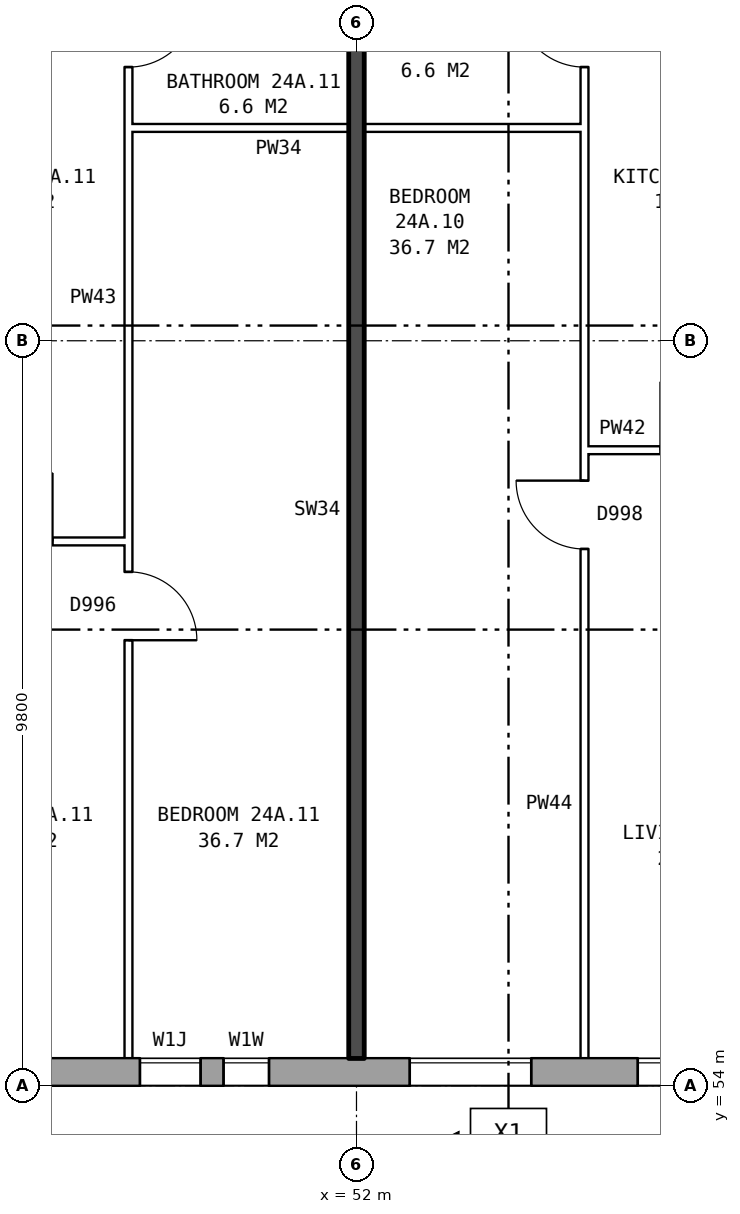
"""IFC4 building model, lengths in metres.
Left out: names, types, materials, properties, quantities, classifications, styles, units other than length and angle.
Written with IfcOpenShell. Run it as: python <this file> out.ifc"""

import sys

from ifc_helpers import new_model, si_unit, direction, frame, frame_2d, origin, place, context, subcontext, project, spatial, rectangle, extrude, element, fill, save


model = new_model("IFC4")
c1 = context("Model", 3, precision=1e-05, world=origin(), true_north=direction((0.0, 1.0)))
c2 = subcontext(c1, "Body", "Model", "MODEL_VIEW")
j1 = project(units=[si_unit("LENGTHUNIT", "METRE"), si_unit("PLANEANGLEUNIT", "RADIAN")], contexts=[c1])
p1 = place(None, origin())
s1 = spatial("IfcSite", under=j1, at=p1, CompositionType="ELEMENT")
p2 = place(p1, origin())
s2 = spatial("IfcBuilding", under=s1, at=p2, CompositionType="ELEMENT")
p3 = place(p2, frame((0.0, 0.0, 87.1)))
s3 = spatial("IfcBuildingStorey", under=s2, at=p3, CompositionType="ELEMENT", Elevation=87.1)
p4 = place(p3, frame((26.325, 54.18, 0.0), z_axis=(0.0, 0.0, 1.0), x_axis=(1.0, 0.0, 0.0)))
e1 = element("IfcWall", 1, at=p4, inside=s3, PredefinedType="STANDARD", context=c2, shape_type="SweptSolid", body=[
    extrude(rectangle(XDim=46.601, YDim=0.36, at=frame_2d((23.3, 0.0))), origin(), (0.0, 0.0, 1.0), 2.85),
])
p5 = place(p4, frame((2.375, 0.0, 0.8)))
e2 = element("IfcOpeningElement", 2, at=p5, cuts=e1, PredefinedType="OPENING", context=c2, shape_type="SweptSolid", body=[
    extrude(rectangle(XDim=1.6, YDim=1.8, at=frame_2d((0.8, 0.9))), frame((0.0, 0.19, 0.0), z_axis=(0.0, -1.0, 0.0), x_axis=(1.0, 0.0, 0.0)), (0.0, 0.0, 1.0), 0.38),
])
p6 = place(p4, frame((5.375, 0.0, 0.8)))
e3 = element("IfcOpeningElement", 3, at=p6, cuts=e1, PredefinedType="OPENING", context=c2, shape_type="SweptSolid", body=[
    extrude(rectangle(XDim=1.6, YDim=1.8, at=frame_2d((0.8, 0.9))), frame((0.0, 0.19, 0.0), z_axis=(0.0, -1.0, 0.0), x_axis=(1.0, 0.0, 0.0)), (0.0, 0.0, 1.0), 0.38),
])
p7 = place(p4, frame((8.375, 0.0, 0.8)))
e4 = element("IfcOpeningElement", 4, at=p7, cuts=e1, PredefinedType="OPENING", context=c2, shape_type="SweptSolid", body=[
    extrude(rectangle(XDim=1.6, YDim=1.8, at=frame_2d((0.8, 0.9))), frame((0.0, 0.19, 0.0), z_axis=(0.0, -1.0, 0.0), x_axis=(1.0, 0.0, 0.0)), (0.0, 0.0, 1.0), 0.38),
])
p8 = place(p4, frame((11.375, 0.0, 0.8)))
e5 = element("IfcOpeningElement", 5, at=p8, cuts=e1, PredefinedType="OPENING", context=c2, shape_type="SweptSolid", body=[
    extrude(rectangle(XDim=1.6, YDim=1.8, at=frame_2d((0.8, 0.9))), frame((0.0, 0.19, 0.0), z_axis=(0.0, -1.0, 0.0), x_axis=(1.0, 0.0, 0.0)), (0.0, 0.0, 1.0), 0.38),
])
p9 = place(p4, frame((14.375, 0.0, 0.8)))
e6 = element("IfcOpeningElement", 6, at=p9, cuts=e1, PredefinedType="OPENING", context=c2, shape_type="SweptSolid", body=[
    extrude(rectangle(XDim=1.6, YDim=1.8, at=frame_2d((0.8, 0.9))), frame((0.0, 0.19, 0.0), z_axis=(0.0, -1.0, 0.0), x_axis=(1.0, 0.0, 0.0)), (0.0, 0.0, 1.0), 0.38),
])
p10 = place(p4, frame((17.375, 0.0, 0.8)))
e7 = element("IfcOpeningElement", 7, at=p10, cuts=e1, PredefinedType="OPENING", context=c2, shape_type="SweptSolid", body=[
    extrude(rectangle(XDim=1.6, YDim=1.8, at=frame_2d((0.8, 0.9))), frame((0.0, 0.19, 0.0), z_axis=(0.0, -1.0, 0.0), x_axis=(1.0, 0.0, 0.0)), (0.0, 0.0, 1.0), 0.38),
])
p11 = place(p4, frame((19.875, 0.0, 1.4)))
e8 = element("IfcOpeningElement", 8, at=p11, cuts=e1, PredefinedType="OPENING", context=c2, shape_type="SweptSolid", body=[
    extrude(rectangle(XDim=1.2, YDim=1.2, at=frame_2d((0.6, 0.6))), frame((0.0, 0.19, 0.0), z_axis=(0.0, -1.0, 0.0), x_axis=(1.0, 0.0, 0.0)), (0.0, 0.0, 1.0), 0.38),
])
p12 = place(p4, frame((22.825, 0.0, 0.25)))
e9 = element("IfcOpeningElement", 9, at=p12, cuts=e1, PredefinedType="OPENING", context=c2, shape_type="SweptSolid", body=[
    extrude(rectangle(XDim=0.8, YDim=1.5, at=frame_2d((0.4, 0.75))), frame((0.0, 0.19, 0.0), z_axis=(0.0, -1.0, 0.0), x_axis=(1.0, 0.0, 0.0)), (0.0, 0.0, 1.0), 0.38),
])
p13 = place(p4, frame((26.375, 0.0, 0.8)))
e10 = element("IfcOpeningElement", 10, at=p13, cuts=e1, PredefinedType="OPENING", context=c2, shape_type="SweptSolid", body=[
    extrude(rectangle(XDim=1.6, YDim=1.8, at=frame_2d((0.8, 0.9))), frame((0.0, 0.19, 0.0), z_axis=(0.0, -1.0, 0.0), x_axis=(1.0, 0.0, 0.0)), (0.0, 0.0, 1.0), 0.38),
])
p14 = place(p4, frame((29.375, 0.0, 0.8)))
e11 = element("IfcOpeningElement", 11, at=p14, cuts=e1, PredefinedType="OPENING", context=c2, shape_type="SweptSolid", body=[
    extrude(rectangle(XDim=1.6, YDim=1.8, at=frame_2d((0.8, 0.9))), frame((0.0, 0.19, 0.0), z_axis=(0.0, -1.0, 0.0), x_axis=(1.0, 0.0, 0.0)), (0.0, 0.0, 1.0), 0.38),
])
p15 = place(p4, frame((32.375, 0.0, 0.8)))
e12 = element("IfcOpeningElement", 12, at=p15, cuts=e1, PredefinedType="OPENING", context=c2, shape_type="SweptSolid", body=[
    extrude(rectangle(XDim=1.6, YDim=1.8, at=frame_2d((0.8, 0.9))), frame((0.0, 0.19, 0.0), z_axis=(0.0, -1.0, 0.0), x_axis=(1.0, 0.0, 0.0)), (0.0, 0.0, 1.0), 0.38),
])
p16 = place(p4, frame((35.375, 0.0, 0.8)))
e13 = element("IfcOpeningElement", 13, at=p16, cuts=e1, PredefinedType="OPENING", context=c2, shape_type="SweptSolid", body=[
    extrude(rectangle(XDim=1.6, YDim=1.8, at=frame_2d((0.8, 0.9))), frame((0.0, 0.19, 0.0), z_axis=(0.0, -1.0, 0.0), x_axis=(1.0, 0.0, 0.0)), (0.0, 0.0, 1.0), 0.38),
])
p17 = place(p4, frame((38.375, 0.0, 0.8)))
e14 = element("IfcOpeningElement", 14, at=p17, cuts=e1, PredefinedType="OPENING", context=c2, shape_type="SweptSolid", body=[
    extrude(rectangle(XDim=1.6, YDim=1.8, at=frame_2d((0.8, 0.9))), frame((0.0, 0.19, 0.0), z_axis=(0.0, -1.0, 0.0), x_axis=(1.0, 0.0, 0.0)), (0.0, 0.0, 1.0), 0.38),
])
p18 = place(p4, frame((41.375, 0.0, 0.8)))
e15 = element("IfcOpeningElement", 15, at=p18, cuts=e1, PredefinedType="OPENING", context=c2, shape_type="SweptSolid", body=[
    extrude(rectangle(XDim=1.6, YDim=1.8, at=frame_2d((0.8, 0.9))), frame((0.0, 0.19, 0.0), z_axis=(0.0, -1.0, 0.0), x_axis=(1.0, 0.0, 0.0)), (0.0, 0.0, 1.0), 0.38),
])
p19 = place(p4, frame((44.375, 0.0, 0.8)))
e16 = element("IfcOpeningElement", 16, at=p19, cuts=e1, PredefinedType="OPENING", context=c2, shape_type="SweptSolid", body=[
    extrude(rectangle(XDim=1.6, YDim=1.8, at=frame_2d((0.8, 0.9))), frame((0.0, 0.19, 0.0), z_axis=(0.0, -1.0, 0.0), x_axis=(1.0, 0.0, 0.0)), (0.0, 0.0, 1.0), 0.38),
])
p20 = place(p4, frame((23.925, 0.0, 0.15)))
e17 = element("IfcOpeningElement", 17, at=p20, cuts=e1, PredefinedType="OPENING", context=c2, shape_type="SweptSolid", body=[
    extrude(rectangle(XDim=0.6, YDim=0.9, at=frame_2d((0.3, 0.45))), frame((0.0, 0.19, 0.0), z_axis=(0.0, -1.0, 0.0), x_axis=(1.0, 0.0, 0.0)), (0.0, 0.0, 1.0), 0.38),
])
p21 = place(p3, frame((46.1, 61.16, 0.0), z_axis=(0.0, 0.0, 1.0), x_axis=(1.0, 0.0, 0.0)))
e18 = element("IfcWall", 18, at=p21, inside=s3, PredefinedType="PARTITIONING", context=c2, shape_type="SweptSolid", body=[
    extrude(rectangle(XDim=2.9, YDim=0.1, at=frame_2d((1.45, 0.0))), origin(), (0.0, 0.0, 1.0), 2.85),
])
p22 = place(p21, frame((1.0, 0.0, 0.0)))
e19 = element("IfcOpeningElement", 19, at=p22, cuts=e18, PredefinedType="OPENING", context=c2, shape_type="SweptSolid", body=[
    extrude(rectangle(XDim=0.9, YDim=2.1, at=frame_2d((0.45, 1.05))), frame((0.0, 0.06, 0.0), z_axis=(0.0, -1.0, 0.0), x_axis=(1.0, 0.0, 0.0)), (0.0, 0.0, 1.0), 0.12),
])
p23 = place(p3, frame((55.0, 62.36, 0.0), z_axis=(0.0, 0.0, 1.0), x_axis=(1.0, 0.0, 0.0)))
e20 = element("IfcWall", 20, at=p23, inside=s3, PredefinedType="PARTITIONING", context=c2, shape_type="SweptSolid", body=[
    extrude(rectangle(XDim=2.9, YDim=0.1, at=frame_2d((1.45, 0.0))), origin(), (0.0, 0.0, 1.0), 2.85),
])
p24 = place(p23, frame((1.0, 0.0, 0.0)))
e21 = element("IfcOpeningElement", 21, at=p24, cuts=e20, PredefinedType="OPENING", context=c2, shape_type="SweptSolid", body=[
    extrude(rectangle(XDim=0.9, YDim=2.1, at=frame_2d((0.45, 1.05))), frame((0.0, 0.06, 0.0), z_axis=(0.0, -1.0, 0.0), x_axis=(1.0, 0.0, 0.0)), (0.0, 0.0, 1.0), 0.12),
])
p25 = place(p3, frame((49.0, 66.6, 0.0), z_axis=(0.0, 0.0, 1.0), x_axis=(1.0, 0.0, 0.0)))
e22 = element("IfcWall", 22, at=p25, inside=s3, PredefinedType="PARTITIONING", context=c2, shape_type="SweptSolid", body=[
    extrude(rectangle(XDim=6.0, YDim=0.1, at=frame_2d((3.0, 0.0))), origin(), (0.0, 0.0, 1.0), 2.85),
])
p26 = place(p3, frame((49.0, 54.36, 0.0), z_axis=(0.0, 0.0, 1.0), x_axis=(0.0, 1.0, 0.0)))
e23 = element("IfcWall", 23, at=p26, inside=s3, PredefinedType="PARTITIONING", context=c2, shape_type="SweptSolid", body=[
    extrude(rectangle(XDim=14.34, YDim=0.1, at=frame_2d((7.17, 0.0))), origin(), (0.0, 0.0, 1.0), 2.85),
])
p27 = place(p26, frame((5.5, 0.0, 0.0)))
e24 = element("IfcOpeningElement", 24, at=p27, cuts=e23, PredefinedType="OPENING", context=c2, shape_type="SweptSolid", body=[
    extrude(rectangle(XDim=0.9, YDim=2.1, at=frame_2d((0.45, 1.05))), frame((0.0, 0.06, 0.0), z_axis=(0.0, -1.0, 0.0), x_axis=(1.0, 0.0, 0.0)), (0.0, 0.0, 1.0), 0.12),
])
p28 = place(p26, frame((13.04, 0.0, 0.0)))
e25 = element("IfcOpeningElement", 25, at=p28, cuts=e23, PredefinedType="OPENING", context=c2, shape_type="SweptSolid", body=[
    extrude(rectangle(XDim=0.9, YDim=2.1, at=frame_2d((0.45, 1.05))), frame((0.0, 0.06, 0.0), z_axis=(0.0, -1.0, 0.0), x_axis=(1.0, 0.0, 0.0)), (0.0, 0.0, 1.0), 0.12),
])
p29 = place(p3, frame((52.0, 54.36, 0.0), z_axis=(0.0, 0.0, 1.0), x_axis=(0.0, 1.0, 0.0)))
e26 = element("IfcWall", 26, at=p29, inside=s3, PredefinedType="SOLIDWALL", context=c2, shape_type="SweptSolid", body=[
    extrude(rectangle(XDim=14.44, YDim=0.2, at=frame_2d((7.22, 0.0))), origin(), (0.0, 0.0, 1.0), 2.85),
])
p30 = place(p3, frame((55.0, 54.36, 0.0), z_axis=(0.0, 0.0, 1.0), x_axis=(0.0, 1.0, 0.0)))
e27 = element("IfcWall", 27, at=p30, inside=s3, PredefinedType="PARTITIONING", context=c2, shape_type="SweptSolid", body=[
    extrude(rectangle(XDim=14.34, YDim=0.1, at=frame_2d((7.17, 0.0))), origin(), (0.0, 0.0, 1.0), 2.85),
])
p31 = place(p30, frame((6.7, 0.0, 0.0)))
e28 = element("IfcOpeningElement", 28, at=p31, cuts=e27, PredefinedType="OPENING", context=c2, shape_type="SweptSolid", body=[
    extrude(rectangle(XDim=0.9, YDim=2.1, at=frame_2d((0.45, 1.05))), frame((0.0, 0.06, 0.0), z_axis=(0.0, -1.0, 0.0), x_axis=(1.0, 0.0, 0.0)), (0.0, 0.0, 1.0), 0.12),
])
p32 = place(p30, frame((13.04, 0.0, 0.0)))
e29 = element("IfcOpeningElement", 29, at=p32, cuts=e27, PredefinedType="OPENING", context=c2, shape_type="SweptSolid", body=[
    extrude(rectangle(XDim=0.9, YDim=2.1, at=frame_2d((0.45, 1.05))), frame((0.0, 0.06, 0.0), z_axis=(0.0, -1.0, 0.0), x_axis=(1.0, 0.0, 0.0)), (0.0, 0.0, 1.0), 0.12),
])
p33 = place(p12, origin())
e30 = element("IfcWindow", 30, at=p33, inside=s3, PartitioningType="SINGLE_PANEL", PredefinedType="WINDOW", context=c2, shape_type="SweptSolid", body=[
    extrude(rectangle(XDim=0.8, YDim=1.5, at=frame_2d((0.4, 0.75))), frame((0.0, 0.15, 0.0), z_axis=(0.0, -1.0, 0.0), x_axis=(1.0, 0.0, 0.0)), (0.0, 0.0, 1.0), 0.06),
])
fill(e9, e30)
p34 = place(p13, origin())
e31 = element("IfcWindow", 31, at=p34, inside=s3, PartitioningType="SINGLE_PANEL", PredefinedType="WINDOW", context=c2, shape_type="SweptSolid", body=[
    extrude(rectangle(XDim=1.6, YDim=1.8, at=frame_2d((0.8, 0.9))), frame((0.0, 0.15, 0.0), z_axis=(0.0, -1.0, 0.0), x_axis=(1.0, 0.0, 0.0)), (0.0, 0.0, 1.0), 0.06),
])
fill(e10, e31)
p35 = place(p14, origin())
e32 = element("IfcWindow", 32, at=p35, inside=s3, PartitioningType="SINGLE_PANEL", PredefinedType="WINDOW", context=c2, shape_type="SweptSolid", body=[
    extrude(rectangle(XDim=1.6, YDim=1.8, at=frame_2d((0.8, 0.9))), frame((0.0, 0.15, 0.0), z_axis=(0.0, -1.0, 0.0), x_axis=(1.0, 0.0, 0.0)), (0.0, 0.0, 1.0), 0.06),
])
fill(e11, e32)
p36 = place(p31, origin())
e33 = element("IfcDoor", 33, at=p36, inside=s3, OperationType="SINGLE_SWING_RIGHT", PredefinedType="DOOR", context=c2, shape_type="SweptSolid", body=[
    extrude(rectangle(XDim=0.9, YDim=2.1, at=frame_2d((0.45, 1.05))), frame((0.0, 0.025, 0.0), z_axis=(0.0, -1.0, 0.0), x_axis=(1.0, 0.0, 0.0)), (0.0, 0.0, 1.0), 0.05),
])
fill(e28, e33)
p37 = place(p32, origin())
e34 = element("IfcDoor", 34, at=p37, inside=s3, OperationType="SINGLE_SWING_RIGHT", PredefinedType="DOOR", context=c2, shape_type="SweptSolid", body=[
    extrude(rectangle(XDim=0.9, YDim=2.1, at=frame_2d((0.45, 1.05))), frame((0.0, 0.025, 0.0), z_axis=(0.0, -1.0, 0.0), x_axis=(1.0, 0.0, 0.0)), (0.0, 0.0, 1.0), 0.05),
])
fill(e29, e34)
p38 = place(p27, frame((0.9, 0.0, 0.0), z_axis=(0.0, 0.0, 1.0), x_axis=(-1.0, 0.0, 0.0)))
e35 = element("IfcDoor", 35, at=p38, inside=s3, OperationType="SINGLE_SWING_RIGHT", PredefinedType="DOOR", context=c2, shape_type="SweptSolid", body=[
    extrude(rectangle(XDim=0.9, YDim=2.1, at=frame_2d((0.45, 1.05))), frame((0.0, 0.025, 0.0), z_axis=(0.0, -1.0, 0.0), x_axis=(1.0, 0.0, 0.0)), (0.0, 0.0, 1.0), 0.05),
])
fill(e24, e35)
p39 = place(p28, frame((0.9, 0.0, 0.0), z_axis=(0.0, 0.0, 1.0), x_axis=(-1.0, 0.0, 0.0)))
e36 = element("IfcDoor", 36, at=p39, inside=s3, OperationType="SINGLE_SWING_LEFT", PredefinedType="DOOR", context=c2, shape_type="SweptSolid", body=[
    extrude(rectangle(XDim=0.9, YDim=2.1, at=frame_2d((0.45, 1.05))), frame((0.0, 0.025, 0.0), z_axis=(0.0, -1.0, 0.0), x_axis=(1.0, 0.0, 0.0)), (0.0, 0.0, 1.0), 0.05),
])
fill(e25, e36)
p40 = place(p20, origin())
e37 = element("IfcWindow", 37, at=p40, inside=s3, PartitioningType="SINGLE_PANEL", PredefinedType="WINDOW", context=c2, shape_type="SweptSolid", body=[
    extrude(rectangle(XDim=0.6, YDim=0.9, at=frame_2d((0.3, 0.45))), frame((0.0, 0.15, 0.0), z_axis=(0.0, -1.0, 0.0), x_axis=(1.0, 0.0, 0.0)), (0.0, 0.0, 1.0), 0.06),
])
fill(e17, e37)
save(model, sys.argv[1])
